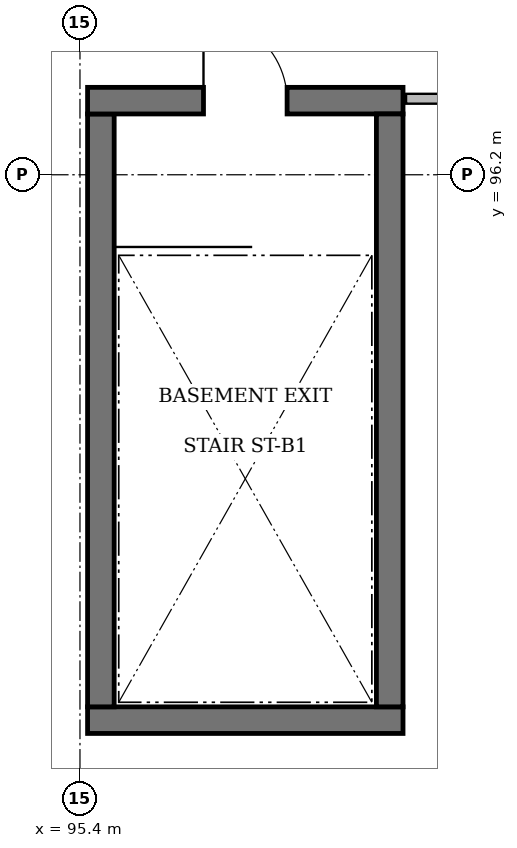
"""IFC4 building model, lengths in metres.
Left out: names, types, materials, properties, quantities, classifications, styles, units other than length and angle.
Written with IfcOpenShell. Run it as: python <this file> out.ifc"""

import sys

from ifc_helpers import new_model, si_unit, direction, frame, frame_2d, origin, place, context, subcontext, project, spatial, rectangle, extrude, element, fill, save


model = new_model("IFC4")
c1 = context("Model", 3, precision=1e-05, world=origin(), true_north=direction((0.0, 1.0)))
c2 = subcontext(c1, "Body", "Model", "MODEL_VIEW")
j1 = project(units=[si_unit("LENGTHUNIT", "METRE"), si_unit("PLANEANGLEUNIT", "RADIAN")], contexts=[c1])
p1 = place(None, origin())
s1 = spatial("IfcSite", under=j1, at=p1, CompositionType="ELEMENT")
p2 = place(p1, origin())
s2 = spatial("IfcBuilding", under=s1, at=p2, CompositionType="ELEMENT")
p3 = place(p2, origin())
s3 = spatial("IfcBuildingStorey", under=s2, at=p3, CompositionType="ELEMENT", Elevation=0.0)
p4 = place(p3, frame((99.65, 89.025, 0.0), z_axis=(0.0, 0.0, 1.0), x_axis=(-1.0, 0.0, 0.0)))
e1 = element("IfcWall", 1, at=p4, inside=s3, PredefinedType="SOLIDWALL", context=c2, shape_type="SweptSolid", body=[
    extrude(rectangle(XDim=4.15, YDim=0.35, at=frame_2d((2.075, 0.0))), origin(), (0.0, 0.0, 1.0), 4.54),
])
p5 = place(p3, frame((95.675, 89.2, 0.0), z_axis=(0.0, 0.0, 1.0), x_axis=(0.0, 1.0, 0.0)))
e2 = element("IfcWall", 2, at=p5, inside=s3, PredefinedType="SOLIDWALL", context=c2, shape_type="SweptSolid", body=[
    extrude(rectangle(XDim=7.8, YDim=0.35, at=frame_2d((3.9, 0.0))), origin(), (0.0, 0.0, 1.0), 4.54),
])
p6 = place(p3, frame((95.5, 97.175, 0.0), z_axis=(0.0, 0.0, 1.0), x_axis=(1.0, 0.0, 0.0)))
e3 = element("IfcWall", 3, at=p6, inside=s3, PredefinedType="SOLIDWALL", context=c2, shape_type="SweptSolid", body=[
    extrude(rectangle(XDim=4.15, YDim=0.35, at=frame_2d((2.075, 0.0))), origin(), (0.0, 0.0, 1.0), 4.54),
])
p7 = place(p6, frame((1.525, 0.0, 0.0)))
e4 = element("IfcOpeningElement", 4, at=p7, cuts=e3, PredefinedType="OPENING", context=c2, shape_type="SweptSolid", body=[
    extrude(rectangle(XDim=1.1, YDim=2.15, at=frame_2d((0.55, 1.075))), frame((0.0, 0.195, 0.0), z_axis=(0.0, -1.0, 0.0), x_axis=(1.0, 0.0, 0.0)), (0.0, 0.0, 1.0), 0.39),
])
p8 = place(p3, frame((99.475, 97.0, 0.0), z_axis=(0.0, 0.0, 1.0), x_axis=(0.0, -1.0, 0.0)))
e5 = element("IfcWall", 5, at=p8, inside=s3, PredefinedType="SOLIDWALL", context=c2, shape_type="SweptSolid", body=[
    extrude(rectangle(XDim=7.8, YDim=0.35, at=frame_2d((3.9, 0.0))), origin(), (0.0, 0.0, 1.0), 4.54),
])
p9 = place(p3, frame((99.69, 97.2, 0.0), z_axis=(0.0, 0.0, 1.0), x_axis=(1.0, 0.0, 0.0)))
e6 = element("IfcWall", 6, at=p9, inside=s3, PredefinedType="PARTITIONING", context=c2, shape_type="SweptSolid", body=[
    extrude(rectangle(XDim=9.91, YDim=0.13, at=frame_2d((4.955, 0.0))), origin(), (0.0, 0.0, 1.0), 4.54),
])
p10 = place(p9, frame((5.971, 0.0, 0.0)))
e7 = element("IfcOpeningElement", 7, at=p10, cuts=e6, PredefinedType="OPENING", context=c2, shape_type="SweptSolid", body=[
    extrude(rectangle(XDim=0.9, YDim=2.15, at=frame_2d((0.45, 1.075))), frame((0.0, 0.085, 0.0), z_axis=(0.0, -1.0, 0.0), x_axis=(1.0, 0.0, 0.0)), (0.0, 0.0, 1.0), 0.17),
])
p11 = place(p7, origin())
e8 = element("IfcDoor", 8, at=p11, inside=s3, OperationType="SINGLE_SWING_LEFT", PredefinedType="DOOR", context=c2, shape_type="SweptSolid", body=[
    extrude(rectangle(XDim=1.1, YDim=2.15, at=frame_2d((0.55, 1.075))), frame((0.0, 0.025, 0.0), z_axis=(0.0, -1.0, 0.0), x_axis=(1.0, 0.0, 0.0)), (0.0, 0.0, 1.0), 0.05),
])
fill(e4, e8)
save(model, sys.argv[1])
